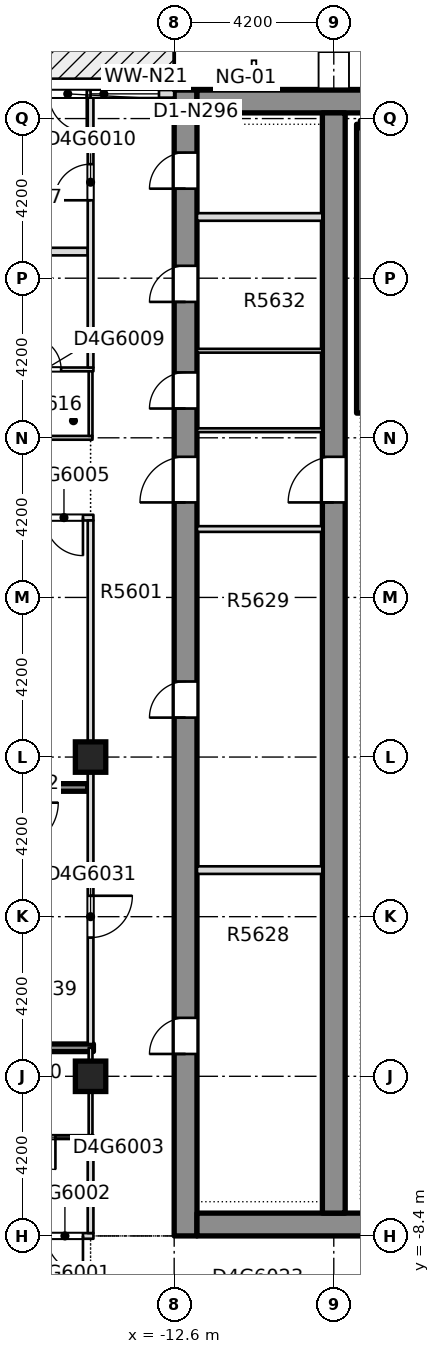
"""IFC4 building model, lengths in metres.
Left out: names, types, materials, properties, quantities, classifications, styles, units other than length and angle.
Written with IfcOpenShell. Run it as: python <this file> out.ifc"""

import sys

from ifc_helpers import new_model, si_unit, direction, frame, frame_2d, origin, origin_2d, place, context, subcontext, project, spatial, rectangle, extrude, element, fill, save


model = new_model("IFC4")
c1 = context("Model", 3, precision=1e-05, world=origin(), true_north=direction((0.0, 1.0)))
c2 = subcontext(c1, "Body", "Model", "MODEL_VIEW")
j1 = project(units=[si_unit("LENGTHUNIT", "METRE"), si_unit("PLANEANGLEUNIT", "RADIAN")], contexts=[c1])
p1 = place(None, origin())
s1 = spatial("IfcSite", under=j1, at=p1, CompositionType="ELEMENT")
p2 = place(p1, origin())
s2 = spatial("IfcBuilding", under=s1, at=p2, CompositionType="ELEMENT")
p3 = place(p2, frame((0.0, 0.0, 213.5)))
s3 = spatial("IfcBuildingStorey", under=s2, at=p3, CompositionType="ELEMENT", Elevation=213.5)
p4 = place(p3, frame((-12.3, -8.4, -0.4), z_axis=(0.0, 0.0, 1.0), x_axis=(0.0, 1.0, 0.0)))
e1 = element("IfcWall", 1, at=p4, inside=s3, PredefinedType="SHEAR", context=c2, shape_type="SweptSolid", body=[
    extrude(rectangle(XDim=30.15, YDim=0.6, at=frame_2d((15.075, 0.0))), origin(), (0.0, 0.0, 1.0), 3.4),
])
p5 = place(p4, frame((4.788, 0.0, 0.4)))
e2 = element("IfcOpeningElement", 2, at=p5, cuts=e1, PredefinedType="OPENING", context=c2, shape_type="SweptSolid", body=[
    extrude(rectangle(XDim=0.95, YDim=2.1, at=frame_2d((0.475, 1.05))), frame((0.0, 0.31, 0.0), z_axis=(0.0, -1.0, 0.0), x_axis=(1.0, 0.0, 0.0)), (0.0, 0.0, 1.0), 0.62),
])
p6 = place(p4, frame((13.638, 0.0, 0.4)))
e3 = element("IfcOpeningElement", 3, at=p6, cuts=e1, PredefinedType="OPENING", context=c2, shape_type="SweptSolid", body=[
    extrude(rectangle(XDim=0.95, YDim=2.1, at=frame_2d((0.475, 1.05))), frame((0.0, 0.31, 0.0), z_axis=(0.0, -1.0, 0.0), x_axis=(1.0, 0.0, 0.0)), (0.0, 0.0, 1.0), 0.62),
])
p7 = place(p4, frame((21.771, 0.0, 0.4)))
e4 = element("IfcOpeningElement", 4, at=p7, cuts=e1, PredefinedType="OPENING", context=c2, shape_type="SweptSolid", body=[
    extrude(rectangle(XDim=0.95, YDim=2.1, at=frame_2d((0.475, 1.05))), frame((0.0, 0.31, 0.0), z_axis=(0.0, -1.0, 0.0), x_axis=(1.0, 0.0, 0.0)), (0.0, 0.0, 1.0), 0.62),
])
p8 = place(p4, frame((24.576, 0.0, 0.4)))
e5 = element("IfcOpeningElement", 5, at=p8, cuts=e1, PredefinedType="OPENING", context=c2, shape_type="SweptSolid", body=[
    extrude(rectangle(XDim=0.95, YDim=2.1, at=frame_2d((0.475, 1.05))), frame((0.0, 0.31, 0.0), z_axis=(0.0, -1.0, 0.0), x_axis=(1.0, 0.0, 0.0)), (0.0, 0.0, 1.0), 0.62),
])
p9 = place(p4, frame((27.555, 0.0, 0.4)))
e6 = element("IfcOpeningElement", 6, at=p9, cuts=e1, PredefinedType="OPENING", context=c2, shape_type="SweptSolid", body=[
    extrude(rectangle(XDim=0.95, YDim=2.1, at=frame_2d((0.475, 1.05))), frame((0.0, 0.31, 0.0), z_axis=(0.0, -1.0, 0.0), x_axis=(1.0, 0.0, 0.0)), (0.0, 0.0, 1.0), 0.62),
])
p10 = place(p4, frame((19.3, 0.0, 0.4)))
e7 = element("IfcOpeningElement", 7, at=p10, cuts=e1, PredefinedType="OPENING", context=c2, shape_type="SweptSolid", body=[
    extrude(rectangle(XDim=1.2, YDim=2.1, at=frame_2d((0.6, 1.05))), frame((0.0, 0.31, 0.0), z_axis=(0.0, -1.0, 0.0), x_axis=(1.0, 0.0, 0.0)), (0.0, 0.0, 1.0), 0.62),
])
p11 = place(p3, frame((-12.0, -8.1, -0.4), z_axis=(0.0, 0.0, 1.0), x_axis=(1.0, 0.0, 0.0)))
e8 = element("IfcWall", 8, at=p11, inside=s3, PredefinedType="SHEAR", context=c2, shape_type="SweptSolid", body=[
    extrude(rectangle(XDim=24.0, YDim=0.6, at=frame_2d((12.0, 0.0))), origin(), (0.0, 0.0, 1.0), 3.4),
])
p12 = place(p11, frame((7.25, 0.0, 0.4)))
e9 = element("IfcOpeningElement", 9, at=p12, cuts=e8, PredefinedType="OPENING", context=c2, shape_type="SweptSolid", body=[
    extrude(rectangle(XDim=1.8, YDim=2.1, at=frame_2d((0.9, 1.05))), frame((0.0, 0.31, 0.0), z_axis=(0.0, -1.0, 0.0), x_axis=(1.0, 0.0, 0.0)), (0.0, 0.0, 1.0), 0.62),
])
p13 = place(p11, frame((14.95, 0.0, 0.4)))
e10 = element("IfcOpeningElement", 10, at=p13, cuts=e8, PredefinedType="OPENING", context=c2, shape_type="SweptSolid", body=[
    extrude(rectangle(XDim=1.8, YDim=2.1, at=frame_2d((0.9, 1.05))), frame((0.0, 0.31, 0.0), z_axis=(0.0, -1.0, 0.0), x_axis=(1.0, 0.0, 0.0)), (0.0, 0.0, 1.0), 0.62),
])
p14 = place(p3, frame((-12.0, 21.45, -0.4), z_axis=(0.0, 0.0, 1.0), x_axis=(1.0, 0.0, 0.0)))
e11 = element("IfcWall", 11, at=p14, inside=s3, PredefinedType="SHEAR", context=c2, shape_type="SweptSolid", body=[
    extrude(rectangle(XDim=24.0, YDim=0.6, at=frame_2d((12.0, 0.0))), origin(), (0.0, 0.0, 1.0), 3.4),
])
p15 = place(p3, frame((-8.4, -7.8, -0.4), z_axis=(0.0, 0.0, 1.0), x_axis=(0.0, 1.0, 0.0)))
e12 = element("IfcWall", 12, at=p15, inside=s3, PredefinedType="SHEAR", context=c2, shape_type="SweptSolid", body=[
    extrude(rectangle(XDim=28.95, YDim=0.6, at=frame_2d((14.475, 0.0))), origin(), (0.0, 0.0, 1.0), 3.4),
])
p16 = place(p15, frame((18.7, 0.0, 0.4)))
e13 = element("IfcOpeningElement", 13, at=p16, cuts=e12, PredefinedType="OPENING", context=c2, shape_type="SweptSolid", body=[
    extrude(rectangle(XDim=1.2, YDim=2.1, at=frame_2d((0.6, 1.05))), frame((0.0, 0.31, 0.0), z_axis=(0.0, -1.0, 0.0), x_axis=(1.0, 0.0, 0.0)), (0.0, 0.0, 1.0), 0.62),
])
for number, where, z_axis, x_axis in (
    (14, (-14.8, -4.2, -0.4), (0.0, 0.0, 1.0), (1.0, 0.0, 0.0)),
    (15, (-14.8, 4.2, -0.4), (0.0, 0.0, 1.0), (1.0, 0.0, 0.0)),
):
    element("IfcColumn", number, at=place(p3, frame(where, z_axis=z_axis, x_axis=x_axis)), inside=s3, PredefinedType="COLUMN", context=c2, shape_type="SweptSolid", body=[
        extrude(rectangle(XDim=0.8, YDim=0.8, at=origin_2d()), origin(), (0.0, 0.0, 1.0), 3.85),
    ])
p17 = place(p3, frame((-25.75, -8.4, 0.0), z_axis=(0.0, 0.0, 1.0), x_axis=(1.0, 0.0, 0.0)))
e16 = element("IfcWall", 16, at=p17, inside=s3, PredefinedType="PARTITIONING", context=c2, shape_type="SweptSolid", body=[
    extrude(rectangle(XDim=11.025, YDim=0.15, at=frame_2d((5.512, 0.0))), origin(), (0.0, 0.0, 1.0), 3.0),
])
p18 = place(p17, frame((9.8, 0.0, 0.0)))
e17 = element("IfcOpeningElement", 17, at=p18, cuts=e16, PredefinedType="OPENING", context=c2, shape_type="SweptSolid", body=[
    extrude(rectangle(XDim=0.95, YDim=2.1, at=frame_2d((0.475, 1.05))), frame((0.0, 0.085, 0.0), z_axis=(0.0, -1.0, 0.0), x_axis=(1.0, 0.0, 0.0)), (0.0, 0.0, 1.0), 0.17),
])
p19 = place(p3, frame((-17.55, -5.8, 0.0), z_axis=(0.0, 0.0, 1.0), x_axis=(1.0, 0.0, 0.0)))
e18 = element("IfcWall", 18, at=p19, inside=s3, PredefinedType="PARTITIONING", context=c2, shape_type="SweptSolid", body=[
    extrude(rectangle(XDim=2.825, YDim=0.1, at=frame_2d((1.413, 0.0))), origin(), (0.0, 0.0, 1.0), 3.0),
])
p20 = place(p19, frame((0.975, 0.0, 0.0)))
e19 = element("IfcOpeningElement", 19, at=p20, cuts=e18, PredefinedType="OPENING", context=c2, shape_type="SweptSolid", body=[
    extrude(rectangle(XDim=0.85, YDim=2.1, at=frame_2d((0.425, 1.05))), frame((0.0, 0.06, 0.0), z_axis=(0.0, -1.0, 0.0), x_axis=(1.0, 0.0, 0.0)), (0.0, 0.0, 1.0), 0.12),
])
p21 = place(p3, frame((-17.55, -3.45, 0.0), z_axis=(0.0, 0.0, 1.0), x_axis=(1.0, 0.0, 0.0)))
e20 = element("IfcWall", 20, at=p21, inside=s3, PredefinedType="SOLIDWALL", context=c2, shape_type="SweptSolid", body=[
    extrude(rectangle(XDim=2.825, YDim=0.2, at=frame_2d((1.413, 0.0))), origin(), (0.0, 0.0, 1.0), 3.0),
])
p22 = place(p3, frame((-20.45, 3.4, 0.0), z_axis=(0.0, 0.0, 1.0), x_axis=(1.0, 0.0, 0.0)))
e21 = element("IfcWall", 21, at=p22, inside=s3, PredefinedType="SOLIDWALL", context=c2, shape_type="SweptSolid", body=[
    extrude(rectangle(XDim=5.575, YDim=0.2, at=frame_2d((2.788, 0.0))), origin(), (0.0, 0.0, 1.0), 3.0),
])
p23 = place(p3, frame((-25.75, 10.5, 0.0), z_axis=(0.0, 0.0, 1.0), x_axis=(1.0, 0.0, 0.0)))
e22 = element("IfcWall", 22, at=p23, inside=s3, PredefinedType="PARTITIONING", context=c2, shape_type="SweptSolid", body=[
    extrude(rectangle(XDim=11.025, YDim=0.15, at=frame_2d((5.512, 0.0))), origin(), (0.0, 0.0, 1.0), 3.0),
])
p24 = place(p23, frame((9.75, 0.0, 0.0)))
e23 = element("IfcOpeningElement", 23, at=p24, cuts=e22, PredefinedType="OPENING", context=c2, shape_type="SweptSolid", body=[
    extrude(rectangle(XDim=1.0, YDim=2.1, at=frame_2d((0.5, 1.05))), frame((0.0, 0.085, 0.0), z_axis=(0.0, -1.0, 0.0), x_axis=(1.0, 0.0, 0.0)), (0.0, 0.0, 1.0), 0.17),
])
p25 = place(p3, frame((-17.25, 12.6, 0.0), z_axis=(0.0, 0.0, 1.0), x_axis=(1.0, 0.0, 0.0)))
e24 = element("IfcWall", 24, at=p25, inside=s3, PredefinedType="PARTITIONING", context=c2, shape_type="SweptSolid", body=[
    extrude(rectangle(XDim=2.5, YDim=0.1, at=frame_2d((1.25, 0.0))), origin(), (0.0, 0.0, 1.0), 3.0),
])
p26 = place(p3, frame((-17.25, 14.4, 0.0), z_axis=(0.0, 0.0, 1.0), x_axis=(1.0, 0.0, 0.0)))
e25 = element("IfcWall", 25, at=p26, inside=s3, PredefinedType="PARTITIONING", context=c2, shape_type="SweptSolid", body=[
    extrude(rectangle(XDim=2.525, YDim=0.1, at=frame_2d((1.262, 0.0))), origin(), (0.0, 0.0, 1.0), 3.0),
])
p27 = place(p26, frame((0.825, 0.0, 0.0)))
e26 = element("IfcOpeningElement", 26, at=p27, cuts=e25, PredefinedType="OPENING", context=c2, shape_type="SweptSolid", body=[
    extrude(rectangle(XDim=0.85, YDim=2.1, at=frame_2d((0.425, 1.05))), frame((0.0, 0.06, 0.0), z_axis=(0.0, -1.0, 0.0), x_axis=(1.0, 0.0, 0.0)), (0.0, 0.0, 1.0), 0.12),
])
p28 = place(p3, frame((-17.35, 17.5, 0.0), z_axis=(0.0, 0.0, 1.0), x_axis=(1.0, 0.0, 0.0)))
e27 = element("IfcWall", 27, at=p28, inside=s3, PredefinedType="PARTITIONING", context=c2, shape_type="SweptSolid", body=[
    extrude(rectangle(XDim=2.475, YDim=0.2, at=frame_2d((1.238, 0.0))), origin(), (0.0, 0.0, 1.0), 3.0),
])
p29 = place(p3, frame((-14.8, -8.325, 0.0), z_axis=(0.0, 0.0, 1.0), x_axis=(0.0, 1.0, 0.0)))
e28 = element("IfcWall", 28, at=p29, inside=s3, PredefinedType="PARTITIONING", context=c2, shape_type="SweptSolid", body=[
    extrude(rectangle(XDim=2.475, YDim=0.15, at=frame_2d((1.237, 0.0))), origin(), (0.0, 0.0, 1.0), 3.0),
])
p30 = place(p3, frame((-14.8, -5.75, 0.0), z_axis=(0.0, 0.0, 1.0), x_axis=(0.0, 1.0, 0.0)))
e29 = element("IfcWall", 29, at=p30, inside=s3, PredefinedType="PARTITIONING", context=c2, shape_type="SweptSolid", body=[
    extrude(rectangle(XDim=2.3, YDim=0.1, at=frame_2d((1.15, 0.0))), origin(), (0.0, 0.0, 1.0), 3.0),
])
p31 = place(p3, frame((-14.8, -3.35, 0.0), z_axis=(0.0, 0.0, 1.0), x_axis=(0.0, 1.0, 0.0)))
e30 = element("IfcWall", 30, at=p31, inside=s3, PredefinedType="PARTITIONING", context=c2, shape_type="SweptSolid", body=[
    extrude(rectangle(XDim=13.775, YDim=0.15, at=frame_2d((6.888, 0.0))), origin(), (0.0, 0.0, 1.0), 3.0),
])
p32 = place(p31, frame((2.8, 0.0, 0.0)))
e31 = element("IfcOpeningElement", 31, at=p32, cuts=e30, PredefinedType="OPENING", context=c2, shape_type="SweptSolid", body=[
    extrude(rectangle(XDim=1.1, YDim=2.1, at=frame_2d((0.55, 1.05))), frame((0.0, 0.085, 0.0), z_axis=(0.0, -1.0, 0.0), x_axis=(1.0, 0.0, 0.0)), (0.0, 0.0, 1.0), 0.17),
])
p33 = place(p3, frame((-14.8, 12.65, 0.0), z_axis=(0.0, 0.0, 1.0), x_axis=(0.0, 1.0, 0.0)))
e32 = element("IfcWall", 32, at=p33, inside=s3, PredefinedType="PARTITIONING", context=c2, shape_type="SweptSolid", body=[
    extrude(rectangle(XDim=1.7, YDim=0.1, at=frame_2d((0.85, 0.0))), origin(), (0.0, 0.0, 1.0), 3.0),
])
p34 = place(p3, frame((-14.8, 14.45, 0.0), z_axis=(0.0, 0.0, 1.0), x_axis=(0.0, 1.0, 0.0)))
e33 = element("IfcWall", 33, at=p34, inside=s3, PredefinedType="PARTITIONING", context=c2, shape_type="SweptSolid", body=[
    extrude(rectangle(XDim=7.1, YDim=0.15, at=frame_2d((3.55, 0.0))), origin(), (0.0, 0.0, 1.0), 3.0),
])
p35 = place(p34, frame((4.4, 0.0, 0.0)))
e34 = element("IfcOpeningElement", 34, at=p35, cuts=e33, PredefinedType="OPENING", context=c2, shape_type="SweptSolid", body=[
    extrude(rectangle(XDim=0.95, YDim=2.1, at=frame_2d((0.475, 1.05))), frame((0.0, 0.085, 0.0), z_axis=(0.0, -1.0, 0.0), x_axis=(1.0, 0.0, 0.0)), (0.0, 0.0, 1.0), 0.17),
])
p36 = place(p3, frame((-12.6, 21.65, 0.0), z_axis=(0.0, 0.0, 1.0), x_axis=(-1.0, 0.0, 0.0)))
e35 = element("IfcWall", 35, at=p36, inside=s3, PredefinedType="STANDARD", context=c2, shape_type="SweptSolid", body=[
    extrude(rectangle(XDim=3.7, YDim=0.2, at=frame_2d((1.85, 0.0))), origin(), (0.0, 0.0, 1.0), 3.0),
])
p37 = place(p36, frame((0.4, 0.0, 0.2)))
e36 = element("IfcOpeningElement", 36, at=p37, cuts=e35, PredefinedType="OPENING", context=c2, shape_type="SweptSolid", body=[
    extrude(rectangle(XDim=1.8, YDim=2.65, at=frame_2d((0.9, 1.325))), frame((0.0, 0.11, 0.0), z_axis=(0.0, -1.0, 0.0), x_axis=(1.0, 0.0, 0.0)), (0.0, 0.0, 1.0), 0.22),
])
p38 = place(p36, frame((2.3, 0.0, 0.0)))
e37 = element("IfcOpeningElement", 37, at=p38, cuts=e35, PredefinedType="OPENING", context=c2, shape_type="SweptSolid", body=[
    extrude(rectangle(XDim=1.0, YDim=2.4, at=frame_2d((0.5, 1.2))), frame((0.0, 0.11, 0.0), z_axis=(0.0, -1.0, 0.0), x_axis=(1.0, 0.0, 0.0)), (0.0, 0.0, 1.0), 0.22),
])
p39 = place(p3, frame((-11.999, 1.225, 0.0), z_axis=(0.0, 0.0, 1.0), x_axis=(1.0, 0.0, 0.0)))
e38 = element("IfcWall", 38, at=p39, inside=s3, PredefinedType="PARTITIONING", context=c2, shape_type="SweptSolid", body=[
    extrude(rectangle(XDim=3.298, YDim=0.2, at=frame_2d((1.649, 0.0))), origin(), (0.0, 0.0, 1.0), 3.0),
])
p40 = place(p3, frame((-11.999, 10.2, 0.0), z_axis=(0.0, 0.0, 1.0), x_axis=(1.0, 0.0, 0.0)))
e39 = element("IfcWall", 39, at=p40, inside=s3, PredefinedType="PARTITIONING", context=c2, shape_type="SweptSolid", body=[
    extrude(rectangle(XDim=3.298, YDim=0.15, at=frame_2d((1.649, 0.0))), origin(), (0.0, 0.0, 1.0), 3.0),
])
for number, where, z_axis, x_axis in (
    (40, (-11.999, 12.8, 0.0), (0.0, 0.0, 1.0), (1.0, 0.0, 0.0)),
    (41, (-11.999, 14.891, 0.0), (0.0, 0.0, 1.0), (1.0, 0.0, 0.0)),
):
    element("IfcWall", number, at=place(p3, frame(where, z_axis=z_axis, x_axis=x_axis)), inside=s3, PredefinedType="PARTITIONING", context=c2, shape_type="SweptSolid", body=[
        extrude(rectangle(XDim=3.298, YDim=0.1, at=frame_2d((1.649, 0.0))), origin(), (0.0, 0.0, 1.0), 3.0),
    ])
p41 = place(p3, frame((-11.999, 18.411, 0.0), z_axis=(0.0, 0.0, 1.0), x_axis=(1.0, 0.0, 0.0)))
e42 = element("IfcWall", 42, at=p41, inside=s3, PredefinedType="PARTITIONING", context=c2, shape_type="SweptSolid", body=[
    extrude(rectangle(XDim=3.298, YDim=0.2, at=frame_2d((1.649, 0.0))), origin(), (0.0, 0.0, 1.0), 3.0),
])
p42 = place(p3, frame((-7.7, 13.25, 0.0), z_axis=(0.0, 0.0, 1.0), x_axis=(0.0, 1.0, 0.0)))
e43 = element("IfcWall", 43, at=p42, inside=s3, PredefinedType="SOLIDWALL", context=c2, shape_type="SweptSolid", body=[
    extrude(rectangle(XDim=7.6, YDim=0.2, at=frame_2d((3.8, 0.0))), origin(), (0.0, 0.0, 1.0), 3.0),
])
p43 = place(p3, frame((-7.7, 20.85, 0.0), z_axis=(0.0, 0.0, 1.0), x_axis=(1.0, 0.0, 0.0)))
e44 = element("IfcWall", 44, at=p43, inside=s3, PredefinedType="SOLIDWALL", context=c2, shape_type="SweptSolid", body=[
    extrude(rectangle(XDim=3.55, YDim=0.2, at=frame_2d((1.775, 0.0))), origin(), (0.0, 0.0, 1.0), 3.0),
])
p44 = place(p18, origin())
e45 = element("IfcDoor", 45, at=p44, inside=s3, OperationType="SINGLE_SWING_LEFT", PredefinedType="DOOR", context=c2, shape_type="SweptSolid", body=[
    extrude(rectangle(XDim=0.95, YDim=2.1, at=frame_2d((0.475, 1.05))), frame((0.0, 0.025, 0.0), z_axis=(0.0, -1.0, 0.0), x_axis=(1.0, 0.0, 0.0)), (0.0, 0.0, 1.0), 0.05),
])
fill(e17, e45)
p45 = place(p20, origin())
e46 = element("IfcDoor", 46, at=p45, inside=s3, OperationType="SINGLE_SWING_LEFT", PredefinedType="DOOR", context=c2, shape_type="SweptSolid", body=[
    extrude(rectangle(XDim=0.85, YDim=2.1, at=frame_2d((0.425, 1.05))), frame((0.0, 0.025, 0.0), z_axis=(0.0, -1.0, 0.0), x_axis=(1.0, 0.0, 0.0)), (0.0, 0.0, 1.0), 0.05),
])
fill(e19, e46)
p46 = place(p24, origin())
e47 = element("IfcDoor", 47, at=p46, inside=s3, OperationType="SINGLE_SWING_RIGHT", PredefinedType="DOOR", context=c2, shape_type="SweptSolid", body=[
    extrude(rectangle(XDim=1.0, YDim=2.1, at=frame_2d((0.5, 1.05))), frame((0.0, 0.025, 0.0), z_axis=(0.0, -1.0, 0.0), x_axis=(1.0, 0.0, 0.0)), (0.0, 0.0, 1.0), 0.05),
])
fill(e23, e47)
p47 = place(p27, origin())
e48 = element("IfcDoor", 48, at=p47, inside=s3, OperationType="SINGLE_SWING_RIGHT", PredefinedType="DOOR", context=c2, shape_type="SweptSolid", body=[
    extrude(rectangle(XDim=0.85, YDim=2.1, at=frame_2d((0.425, 1.05))), frame((0.0, 0.025, 0.0), z_axis=(0.0, -1.0, 0.0), x_axis=(1.0, 0.0, 0.0)), (0.0, 0.0, 1.0), 0.05),
])
fill(e26, e48)
p48 = place(p35, origin())
e49 = element("IfcDoor", 49, at=p48, inside=s3, OperationType="SINGLE_SWING_LEFT", PredefinedType="DOOR", context=c2, shape_type="SweptSolid", body=[
    extrude(rectangle(XDim=0.95, YDim=2.1, at=frame_2d((0.475, 1.05))), frame((0.0, 0.025, 0.0), z_axis=(0.0, -1.0, 0.0), x_axis=(1.0, 0.0, 0.0)), (0.0, 0.0, 1.0), 0.05),
])
fill(e34, e49)
p49 = place(p32, origin())
e50 = element("IfcDoor", 50, at=p49, inside=s3, OperationType="SINGLE_SWING_RIGHT", PredefinedType="DOOR", context=c2, shape_type="SweptSolid", body=[
    extrude(rectangle(XDim=1.1, YDim=2.1, at=frame_2d((0.55, 1.05))), frame((0.0, 0.025, 0.0), z_axis=(0.0, -1.0, 0.0), x_axis=(1.0, 0.0, 0.0)), (0.0, 0.0, 1.0), 0.05),
])
fill(e31, e50)
p50 = place(p37, origin())
e51 = element("IfcWindow", 51, at=p50, inside=s3, PartitioningType="SINGLE_PANEL", PredefinedType="WINDOW", context=c2, shape_type="SweptSolid", body=[
    extrude(rectangle(XDim=1.8, YDim=2.65, at=frame_2d((0.9, 1.325))), frame((0.0, 0.03, 0.0), z_axis=(0.0, -1.0, 0.0), x_axis=(1.0, 0.0, 0.0)), (0.0, 0.0, 1.0), 0.06),
])
fill(e36, e51)
p51 = place(p38, origin())
e52 = element("IfcDoor", 52, at=p51, inside=s3, OperationType="SINGLE_SWING_LEFT", PredefinedType="DOOR", context=c2, shape_type="SweptSolid", body=[
    extrude(rectangle(XDim=1.0, YDim=2.4, at=frame_2d((0.5, 1.2))), frame((0.0, 0.025, 0.0), z_axis=(0.0, -1.0, 0.0), x_axis=(1.0, 0.0, 0.0)), (0.0, 0.0, 1.0), 0.05),
])
fill(e37, e52)
p52 = place(p5, origin())
e53 = element("IfcDoor", 53, at=p52, inside=s3, OperationType="SINGLE_SWING_LEFT", PredefinedType="DOOR", context=c2, shape_type="SweptSolid", body=[
    extrude(rectangle(XDim=0.95, YDim=2.1, at=frame_2d((0.475, 1.05))), frame((0.0, 0.025, 0.0), z_axis=(0.0, -1.0, 0.0), x_axis=(1.0, 0.0, 0.0)), (0.0, 0.0, 1.0), 0.05),
])
fill(e2, e53)
p53 = place(p6, origin())
e54 = element("IfcDoor", 54, at=p53, inside=s3, OperationType="SINGLE_SWING_LEFT", PredefinedType="DOOR", context=c2, shape_type="SweptSolid", body=[
    extrude(rectangle(XDim=0.95, YDim=2.1, at=frame_2d((0.475, 1.05))), frame((0.0, 0.025, 0.0), z_axis=(0.0, -1.0, 0.0), x_axis=(1.0, 0.0, 0.0)), (0.0, 0.0, 1.0), 0.05),
])
fill(e3, e54)
p54 = place(p7, origin())
e55 = element("IfcDoor", 55, at=p54, inside=s3, OperationType="SINGLE_SWING_LEFT", PredefinedType="DOOR", context=c2, shape_type="SweptSolid", body=[
    extrude(rectangle(XDim=0.95, YDim=2.1, at=frame_2d((0.475, 1.05))), frame((0.0, 0.025, 0.0), z_axis=(0.0, -1.0, 0.0), x_axis=(1.0, 0.0, 0.0)), (0.0, 0.0, 1.0), 0.05),
])
fill(e4, e55)
p55 = place(p8, origin())
e56 = element("IfcDoor", 56, at=p55, inside=s3, OperationType="SINGLE_SWING_LEFT", PredefinedType="DOOR", context=c2, shape_type="SweptSolid", body=[
    extrude(rectangle(XDim=0.95, YDim=2.1, at=frame_2d((0.475, 1.05))), frame((0.0, 0.025, 0.0), z_axis=(0.0, -1.0, 0.0), x_axis=(1.0, 0.0, 0.0)), (0.0, 0.0, 1.0), 0.05),
])
fill(e5, e56)
p56 = place(p9, origin())
e57 = element("IfcDoor", 57, at=p56, inside=s3, OperationType="SINGLE_SWING_LEFT", PredefinedType="DOOR", context=c2, shape_type="SweptSolid", body=[
    extrude(rectangle(XDim=0.95, YDim=2.1, at=frame_2d((0.475, 1.05))), frame((0.0, 0.025, 0.0), z_axis=(0.0, -1.0, 0.0), x_axis=(1.0, 0.0, 0.0)), (0.0, 0.0, 1.0), 0.05),
])
fill(e6, e57)
p57 = place(p10, origin())
e58 = element("IfcDoor", 58, at=p57, inside=s3, OperationType="SINGLE_SWING_LEFT", PredefinedType="DOOR", context=c2, shape_type="SweptSolid", body=[
    extrude(rectangle(XDim=1.2, YDim=2.1, at=frame_2d((0.6, 1.05))), frame((0.0, 0.025, 0.0), z_axis=(0.0, -1.0, 0.0), x_axis=(1.0, 0.0, 0.0)), (0.0, 0.0, 1.0), 0.05),
])
fill(e7, e58)
p58 = place(p16, origin())
e59 = element("IfcDoor", 59, at=p58, inside=s3, OperationType="SINGLE_SWING_LEFT", PredefinedType="DOOR", context=c2, shape_type="SweptSolid", body=[
    extrude(rectangle(XDim=1.2, YDim=2.1, at=frame_2d((0.6, 1.05))), frame((0.0, 0.025, 0.0), z_axis=(0.0, -1.0, 0.0), x_axis=(1.0, 0.0, 0.0)), (0.0, 0.0, 1.0), 0.05),
])
fill(e13, e59)
save(model, sys.argv[1])
